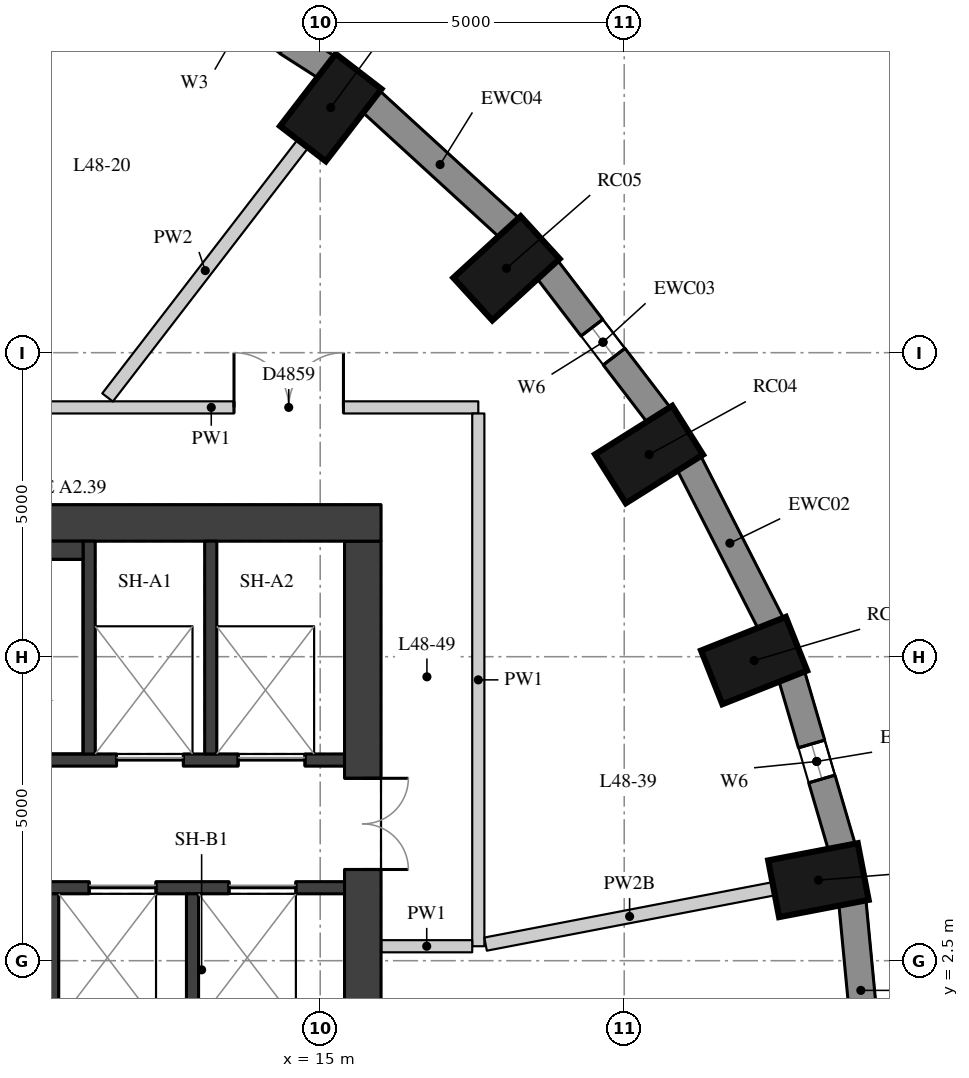
"""IFC4 building model, lengths in metres.
Left out: names, types, materials, properties, quantities, classifications, styles, units other than length and angle.
Written with IfcOpenShell. Run it as: python <this file> out.ifc"""

import sys

from ifc_helpers import new_model, si_unit, direction, frame, frame_2d, origin, origin_2d, place, context, subcontext, project, spatial, rectangle, extrude, element, fill, save


model = new_model("IFC4")
c1 = context("Model", 3, precision=1e-05, world=origin(), true_north=direction((0.0, 1.0)))
c2 = subcontext(c1, "Body", "Model", "MODEL_VIEW")
j1 = project(units=[si_unit("LENGTHUNIT", "METRE"), si_unit("PLANEANGLEUNIT", "RADIAN")], contexts=[c1])
p1 = place(None, origin())
s1 = spatial("IfcSite", under=j1, at=p1, CompositionType="ELEMENT")
p2 = place(p1, origin())
s2 = spatial("IfcBuilding", under=s1, at=p2, CompositionType="ELEMENT")
p3 = place(p2, frame((0.0, 0.0, 171.5)))
s3 = spatial("IfcBuildingStorey", under=s2, at=p3, CompositionType="ELEMENT", Elevation=171.5)
for number, where, z_axis, x_axis in (
    (1, (23.194, 3.825, 0.0), (0.0, 0.0, 1.0), (0.982, 0.189, 0.0)),
    (2, (22.136, 7.436, 0.0), (0.0, 0.0, 1.0), (0.93, 0.369, 0.0)),
    (3, (20.408, 10.825, 0.0), (0.0, 0.0, 1.0), (0.846, 0.533, 0.0)),
    (4, (18.064, 13.888, 0.0), (0.0, 0.0, 1.0), (0.738, 0.675, 0.0)),
    (5, (15.173, 16.532, 0.0), (0.0, 0.0, 1.0), (0.61, 0.792, 0.0)),
):
    element("IfcColumn", number, at=place(p3, frame(where, z_axis=z_axis, x_axis=x_axis)), inside=s3, PredefinedType="COLUMN", context=c2, shape_type="SweptSolid", body=[
        extrude(rectangle(XDim=1.5, YDim=0.95, at=origin_2d()), origin(), (0.0, 0.0, 1.0), 3.3),
    ])
p4 = place(p3, frame((24.031, 0.555, 0.0), z_axis=(0.0, 0.0, 1.0), x_axis=(-0.095265737322, 0.995451876935, 0.0)))
e6 = element("IfcWall", 6, at=p4, inside=s3, PredefinedType="SOLIDWALL", context=c2, shape_type="SweptSolid", body=[
    extrude(rectangle(XDim=2.927, YDim=0.45, at=frame_2d((1.463, 0.0))), origin(), (0.0, 0.0, 1.0), 3.02),
])
p5 = place(p3, frame((23.58, 4.362, 0.0), z_axis=(0.0, 0.0, 1.0), x_axis=(-0.281049481624, 0.959693278542, 0.0)))
e7 = element("IfcWall", 7, at=p5, inside=s3, PredefinedType="SOLIDWALL", context=c2, shape_type="SweptSolid", body=[
    extrude(rectangle(XDim=2.948, YDim=0.45, at=frame_2d((1.474, 0.0))), origin(), (0.0, 0.0, 1.0), 3.02),
])
p6 = place(p5, frame((1.174, 0.0, 0.4)))
e8 = element("IfcOpeningElement", 8, at=p6, cuts=e7, PredefinedType="OPENING", context=c2, shape_type="SweptSolid", body=[
    extrude(rectangle(XDim=0.6, YDim=1.75, at=frame_2d((0.3, 0.875))), frame((0.0, 0.235, 0.0), z_axis=(0.0, -1.0, 0.0), x_axis=(1.0, 0.0, 0.0)), (0.0, 0.0, 1.0), 0.47),
])
p7 = place(p3, frame((22.415, 8.037, 0.0), z_axis=(0.0, 0.0, 1.0), x_axis=(-0.454133999889, 0.890933392653, 0.0)))
e9 = element("IfcWall", 9, at=p7, inside=s3, PredefinedType="SOLIDWALL", context=c2, shape_type="SweptSolid", body=[
    extrude(rectangle(XDim=2.986, YDim=0.45, at=frame_2d((1.493, 0.0))), origin(), (0.0, 0.0, 1.0), 3.02),
])
p8 = place(p3, frame((20.574, 11.467, 0.0), z_axis=(0.0, 0.0, 1.0), x_axis=(-0.607817056371, 0.794077090706, 0.0)))
e10 = element("IfcWall", 10, at=p8, inside=s3, PredefinedType="SOLIDWALL", context=c2, shape_type="SweptSolid", body=[
    extrude(rectangle(XDim=3.037, YDim=0.45, at=frame_2d((1.519, 0.0))), origin(), (0.0, 0.0, 1.0), 3.02),
])
p9 = place(p8, frame((1.219, 0.0, 0.4)))
e11 = element("IfcOpeningElement", 11, at=p9, cuts=e10, PredefinedType="OPENING", context=c2, shape_type="SweptSolid", body=[
    extrude(rectangle(XDim=0.6, YDim=1.75, at=frame_2d((0.3, 0.875))), frame((0.0, 0.235, 0.0), z_axis=(0.0, -1.0, 0.0), x_axis=(1.0, 0.0, 0.0)), (0.0, 0.0, 1.0), 0.47),
])
p10 = place(p3, frame((18.113, 14.55, 0.0), z_axis=(0.0, 0.0, 1.0), x_axis=(-0.737808755941, 0.675009807082, 0.0)))
e12 = element("IfcWall", 12, at=p10, inside=s3, PredefinedType="SOLIDWALL", context=c2, shape_type="SweptSolid", body=[
    extrude(rectangle(XDim=3.094, YDim=0.45, at=frame_2d((1.547, 0.0))), origin(), (0.0, 0.0, 1.0), 3.02),
])
p11 = place(p3, frame((15.108, 17.193, 0.0), z_axis=(0.0, 0.0, 1.0), x_axis=(-0.842030726237, 0.539429565442, 0.0)))
e13 = element("IfcWall", 13, at=p11, inside=s3, PredefinedType="SOLIDWALL", context=c2, shape_type="SweptSolid", body=[
    extrude(rectangle(XDim=3.151, YDim=0.45, at=frame_2d((1.576, 0.0))), origin(), (0.0, 0.0, 1.0), 3.02),
])
p12 = place(p11, frame((0.776, 0.0, 0.4)))
e14 = element("IfcOpeningElement", 14, at=p12, cuts=e13, PredefinedType="OPENING", context=c2, shape_type="SweptSolid", body=[
    extrude(rectangle(XDim=1.6, YDim=1.75, at=frame_2d((0.8, 0.875))), frame((0.0, 0.235, 0.0), z_axis=(0.0, -1.0, 0.0), x_axis=(1.0, 0.0, 0.0)), (0.0, 0.0, 1.0), 0.47),
])
p13 = place(p3, frame((15.7, -9.4, 0.0), z_axis=(0.0, 0.0, 1.0), x_axis=(0.0, 1.0, 0.0)))
e15 = element("IfcWall", 15, at=p13, inside=s3, PredefinedType="SHEAR", context=c2, shape_type="SweptSolid", body=[
    extrude(rectangle(XDim=18.8, YDim=0.6, at=frame_2d((9.4, 0.0))), origin(), (0.0, 0.0, 1.0), 3.02),
])
p14 = place(p13, frame((13.4, 0.0, 0.0)))
e16 = element("IfcOpeningElement", 16, at=p14, cuts=e15, PredefinedType="OPENING", context=c2, shape_type="SweptSolid", body=[
    extrude(rectangle(XDim=1.5, YDim=2.1, at=frame_2d((0.75, 1.05))), frame((0.0, 0.31, 0.0), z_axis=(0.0, -1.0, 0.0), x_axis=(1.0, 0.0, 0.0)), (0.0, 0.0, 1.0), 0.62),
])
p15 = place(p13, frame((3.9, 0.0, 0.0)))
e17 = element("IfcOpeningElement", 17, at=p15, cuts=e15, PredefinedType="OPENING", context=c2, shape_type="SweptSolid", body=[
    extrude(rectangle(XDim=1.5, YDim=2.1, at=frame_2d((0.75, 1.05))), frame((0.0, 0.31, 0.0), z_axis=(0.0, -1.0, 0.0), x_axis=(1.0, 0.0, 0.0)), (0.0, 0.0, 1.0), 0.62),
])
p16 = place(p3, frame((4.0, 9.7, 0.0), z_axis=(0.0, 0.0, 1.0), x_axis=(1.0, 0.0, 0.0)))
e18 = element("IfcWall", 18, at=p16, inside=s3, PredefinedType="SHEAR", context=c2, shape_type="SweptSolid", body=[
    extrude(rectangle(XDim=12.0, YDim=0.6, at=frame_2d((6.0, 0.0))), origin(), (0.0, 0.0, 1.0), 3.02),
])
p17 = place(p3, frame((4.6, 5.8, 0.0), z_axis=(0.0, 0.0, 1.0), x_axis=(1.0, 0.0, 0.0)))
e19 = element("IfcWall", 19, at=p17, inside=s3, PredefinedType="SHEAR", context=c2, shape_type="SweptSolid", body=[
    extrude(rectangle(XDim=10.8, YDim=0.2, at=frame_2d((5.4, 0.0))), origin(), (0.0, 0.0, 1.0), 3.02),
])
p18 = place(p17, frame((7.05, 0.0, 0.0)))
e20 = element("IfcOpeningElement", 20, at=p18, cuts=e19, PredefinedType="OPENING", context=c2, shape_type="SweptSolid", body=[
    extrude(rectangle(XDim=1.1, YDim=2.1, at=frame_2d((0.55, 1.05))), frame((0.0, 0.11, 0.0), z_axis=(0.0, -1.0, 0.0), x_axis=(1.0, 0.0, 0.0)), (0.0, 0.0, 1.0), 0.22),
])
p19 = place(p17, frame((9.05, 0.0, 0.0)))
e21 = element("IfcOpeningElement", 21, at=p19, cuts=e19, PredefinedType="OPENING", context=c2, shape_type="SweptSolid", body=[
    extrude(rectangle(XDim=1.1, YDim=2.1, at=frame_2d((0.55, 1.05))), frame((0.0, 0.11, 0.0), z_axis=(0.0, -1.0, 0.0), x_axis=(1.0, 0.0, 0.0)), (0.0, 0.0, 1.0), 0.22),
])
p20 = place(p3, frame((4.6, 3.7, 0.0), z_axis=(0.0, 0.0, 1.0), x_axis=(1.0, 0.0, 0.0)))
e22 = element("IfcWall", 22, at=p20, inside=s3, PredefinedType="SHEAR", context=c2, shape_type="SweptSolid", body=[
    extrude(rectangle(XDim=10.8, YDim=0.2, at=frame_2d((5.4, 0.0))), origin(), (0.0, 0.0, 1.0), 3.02),
])
p21 = place(p20, frame((6.6, 0.0, 0.0)))
e23 = element("IfcOpeningElement", 23, at=p21, cuts=e22, PredefinedType="OPENING", context=c2, shape_type="SweptSolid", body=[
    extrude(rectangle(XDim=1.1, YDim=2.1, at=frame_2d((0.55, 1.05))), frame((0.0, 0.11, 0.0), z_axis=(0.0, -1.0, 0.0), x_axis=(1.0, 0.0, 0.0)), (0.0, 0.0, 1.0), 0.22),
])
p22 = place(p20, frame((8.9, 0.0, 0.0)))
e24 = element("IfcOpeningElement", 24, at=p22, cuts=e22, PredefinedType="OPENING", context=c2, shape_type="SweptSolid", body=[
    extrude(rectangle(XDim=1.1, YDim=2.1, at=frame_2d((0.55, 1.05))), frame((0.0, 0.11, 0.0), z_axis=(0.0, -1.0, 0.0), x_axis=(1.0, 0.0, 0.0)), (0.0, 0.0, 1.0), 0.22),
])
for number, where, z_axis, x_axis in (
    (25, (11.2, 5.9, 0.0), (0.0, 0.0, 1.0), (0.0, 1.0, 0.0)),
    (26, (13.2, 5.9, 0.0), (0.0, 0.0, 1.0), (0.0, 1.0, 0.0)),
):
    element("IfcWall", number, at=place(p3, frame(where, z_axis=z_axis, x_axis=x_axis)), inside=s3, PredefinedType="SHEAR", context=c2, shape_type="SweptSolid", body=[
        extrude(rectangle(XDim=3.5, YDim=0.2, at=frame_2d((1.75, 0.0))), origin(), (0.0, 0.0, 1.0), 3.02),
    ])
for number, where, z_axis, x_axis in (
    (27, (10.6, 1.1, 0.0), (0.0, 0.0, 1.0), (0.0, 1.0, 0.0)),
    (28, (12.9, 1.1, 0.0), (0.0, 0.0, 1.0), (0.0, 1.0, 0.0)),
):
    element("IfcWall", number, at=place(p3, frame(where, z_axis=z_axis, x_axis=x_axis)), inside=s3, PredefinedType="SHEAR", context=c2, shape_type="SweptSolid", body=[
        extrude(rectangle(XDim=2.5, YDim=0.2, at=frame_2d((1.25, 0.0))), origin(), (0.0, 0.0, 1.0), 3.02),
    ])
p23 = place(p3, frame((6.22, 9.25, 0.0), z_axis=(0.0, 0.0, 1.0), x_axis=(1.0, 0.0, 0.0)))
e29 = element("IfcWall", 29, at=p23, inside=s3, PredefinedType="PARTITIONING", context=c2, shape_type="SweptSolid", body=[
    extrude(rectangle(XDim=4.88, YDim=0.3, at=frame_2d((2.44, 0.0))), origin(), (0.0, 0.0, 1.0), 3.02),
])
p24 = place(p3, frame((8.817, 11.6, 0.0), z_axis=(0.0, 0.0, 1.0), x_axis=(1.0, 0.0, 0.0)))
e30 = element("IfcWall", 30, at=p24, inside=s3, PredefinedType="PARTITIONING", context=c2, shape_type="SweptSolid", body=[
    extrude(rectangle(XDim=8.783, YDim=0.2, at=frame_2d((4.392, 0.0))), origin(), (0.0, 0.0, 1.0), 3.02),
])
p25 = place(p24, frame((0.14, 0.0, 0.0)))
e31 = element("IfcOpeningElement", 31, at=p25, cuts=e30, PredefinedType="OPENING", context=c2, shape_type="SweptSolid", body=[
    extrude(rectangle(XDim=1.1, YDim=2.1, at=frame_2d((0.55, 1.05))), frame((0.0, 0.11, 0.0), z_axis=(0.0, -1.0, 0.0), x_axis=(1.0, 0.0, 0.0)), (0.0, 0.0, 1.0), 0.22),
])
p26 = place(p24, frame((4.766, 0.0, 0.0)))
e32 = element("IfcOpeningElement", 32, at=p26, cuts=e30, PredefinedType="OPENING", context=c2, shape_type="SweptSolid", body=[
    extrude(rectangle(XDim=1.8, YDim=2.1, at=frame_2d((0.9, 1.05))), frame((0.0, 0.11, 0.0), z_axis=(0.0, -1.0, 0.0), x_axis=(1.0, 0.0, 0.0)), (0.0, 0.0, 1.0), 0.22),
])
p27 = place(p3, frame((17.6, 11.5, 0.0), z_axis=(0.0, 0.0, 1.0), x_axis=(0.0, -1.0, 0.0)))
e33 = element("IfcWall", 33, at=p27, inside=s3, PredefinedType="PARTITIONING", context=c2, shape_type="SweptSolid", body=[
    extrude(rectangle(XDim=8.762, YDim=0.2, at=frame_2d((4.381, 0.0))), origin(), (0.0, 0.0, 1.0), 3.02),
])
p28 = place(p3, frame((17.5, 2.738, 0.0), z_axis=(0.0, 0.0, 1.0), x_axis=(-1.0, 0.0, 0.0)))
e34 = element("IfcWall", 34, at=p28, inside=s3, PredefinedType="PARTITIONING", context=c2, shape_type="SweptSolid", body=[
    extrude(rectangle(XDim=1.496, YDim=0.2, at=frame_2d((0.748, 0.0))), origin(), (0.0, 0.0, 1.0), 3.02),
])
p29 = place(p3, frame((22.457, 3.683, 0.0), z_axis=(0.0, 0.0, 1.0), x_axis=(-0.982022686577, -0.188762928159, 0.0)))
e35 = element("IfcWall", 35, at=p29, inside=s3, PredefinedType="PARTITIONING", context=c2, shape_type="SweptSolid", body=[
    extrude(rectangle(XDim=4.824, YDim=0.22, at=frame_2d((2.412, 0.0))), origin(), (0.0, 0.0, 1.0), 2.57),
])
p30 = place(p3, frame((14.716, 15.937, 0.0), z_axis=(0.0, 0.0, 1.0), x_axis=(-0.61000193202, -0.792399926131, 0.0)))
e36 = element("IfcWall", 36, at=p30, inside=s3, PredefinedType="PARTITIONING", context=c2, shape_type="SweptSolid", body=[
    extrude(rectangle(XDim=5.267, YDim=0.22, at=frame_2d((2.634, 0.0))), origin(), (0.0, 0.0, 1.0), 3.02),
])
p31 = place(p6, origin())
e37 = element("IfcWindow", 37, at=p31, inside=s3, PartitioningType="SINGLE_PANEL", PredefinedType="WINDOW", context=c2, shape_type="SweptSolid", body=[
    extrude(rectangle(XDim=0.6, YDim=1.75, at=frame_2d((0.3, 0.875))), frame((0.0, 0.035, 0.0), z_axis=(0.0, -1.0, 0.0), x_axis=(1.0, 0.0, 0.0)), (0.0, 0.0, 1.0), 0.06),
])
fill(e8, e37)
p32 = place(p9, origin())
e38 = element("IfcWindow", 38, at=p32, inside=s3, PartitioningType="SINGLE_PANEL", PredefinedType="WINDOW", context=c2, shape_type="SweptSolid", body=[
    extrude(rectangle(XDim=0.6, YDim=1.75, at=frame_2d((0.3, 0.875))), frame((0.0, 0.035, 0.0), z_axis=(0.0, -1.0, 0.0), x_axis=(1.0, 0.0, 0.0)), (0.0, 0.0, 1.0), 0.06),
])
fill(e11, e38)
p33 = place(p14, origin())
e39 = element("IfcDoor", 39, at=p33, inside=s3, OperationType="DOUBLE_DOOR_SINGLE_SWING", PredefinedType="DOOR", context=c2, shape_type="SweptSolid", body=[
    extrude(rectangle(XDim=1.5, YDim=2.1, at=frame_2d((0.75, 1.05))), frame((0.0, 0.025, 0.0), z_axis=(0.0, -1.0, 0.0), x_axis=(1.0, 0.0, 0.0)), (0.0, 0.0, 1.0), 0.05),
])
fill(e16, e39)
p34 = place(p18, origin())
e40 = element("IfcDoor", 40, at=p34, inside=s3, OperationType="DOUBLE_DOOR_SLIDING", PredefinedType="DOOR", context=c2, shape_type="SweptSolid", body=[
    extrude(rectangle(XDim=1.1, YDim=2.1, at=frame_2d((0.55, 1.05))), frame((0.0, 0.025, 0.0), z_axis=(0.0, -1.0, 0.0), x_axis=(1.0, 0.0, 0.0)), (0.0, 0.0, 1.0), 0.05),
])
fill(e20, e40)
p35 = place(p19, origin())
e41 = element("IfcDoor", 41, at=p35, inside=s3, OperationType="DOUBLE_DOOR_SLIDING", PredefinedType="DOOR", context=c2, shape_type="SweptSolid", body=[
    extrude(rectangle(XDim=1.1, YDim=2.1, at=frame_2d((0.55, 1.05))), frame((0.0, 0.025, 0.0), z_axis=(0.0, -1.0, 0.0), x_axis=(1.0, 0.0, 0.0)), (0.0, 0.0, 1.0), 0.05),
])
fill(e21, e41)
p36 = place(p21, origin())
e42 = element("IfcDoor", 42, at=p36, inside=s3, OperationType="DOUBLE_DOOR_SLIDING", PredefinedType="DOOR", context=c2, shape_type="SweptSolid", body=[
    extrude(rectangle(XDim=1.1, YDim=2.1, at=frame_2d((0.55, 1.05))), frame((0.0, 0.025, 0.0), z_axis=(0.0, -1.0, 0.0), x_axis=(1.0, 0.0, 0.0)), (0.0, 0.0, 1.0), 0.05),
])
fill(e23, e42)
p37 = place(p22, origin())
e43 = element("IfcDoor", 43, at=p37, inside=s3, OperationType="DOUBLE_DOOR_SLIDING", PredefinedType="DOOR", context=c2, shape_type="SweptSolid", body=[
    extrude(rectangle(XDim=1.1, YDim=2.1, at=frame_2d((0.55, 1.05))), frame((0.0, 0.025, 0.0), z_axis=(0.0, -1.0, 0.0), x_axis=(1.0, 0.0, 0.0)), (0.0, 0.0, 1.0), 0.05),
])
fill(e24, e43)
p38 = place(p26, origin())
e44 = element("IfcDoor", 44, at=p38, inside=s3, OperationType="DOUBLE_DOOR_SINGLE_SWING", PredefinedType="DOOR", context=c2, shape_type="SweptSolid", body=[
    extrude(rectangle(XDim=1.8, YDim=2.1, at=frame_2d((0.9, 1.05))), frame((0.0, 0.025, 0.0), z_axis=(0.0, -1.0, 0.0), x_axis=(1.0, 0.0, 0.0)), (0.0, 0.0, 1.0), 0.05),
])
fill(e32, e44)
save(model, sys.argv[1])
